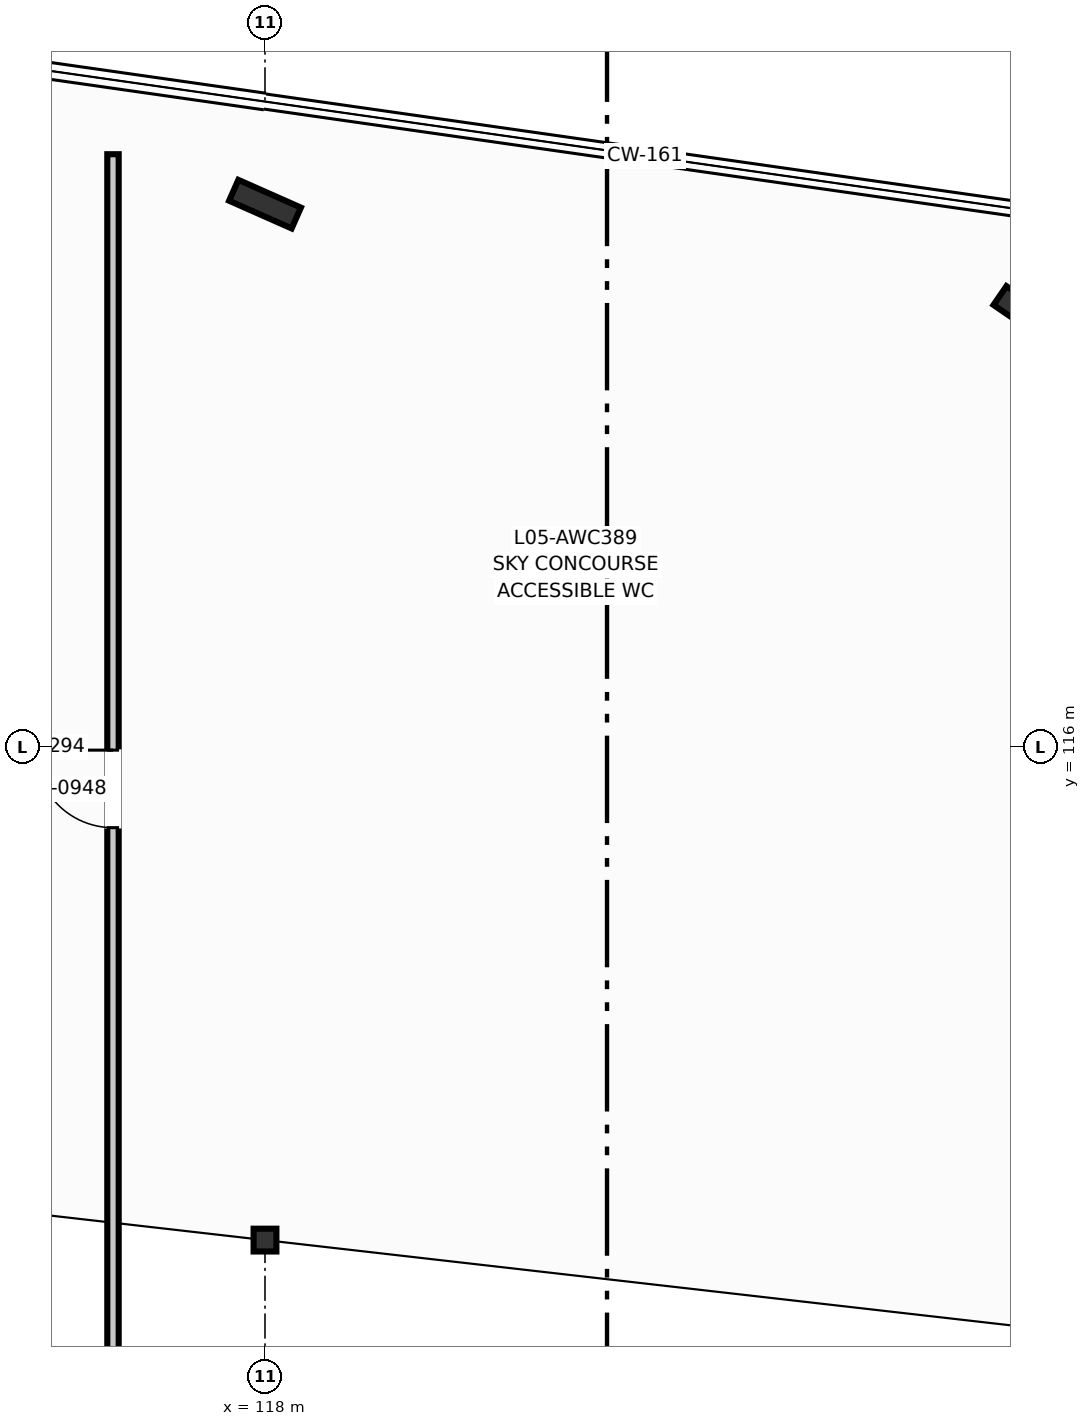
"""IFC4 building model, lengths in metres.
Left out: names, types, materials, properties, quantities, classifications, styles, units other than length and angle.
Written with IfcOpenShell. Run it as: python <this file> out.ifc"""

import sys

from ifc_helpers import new_model, si_unit, direction, frame, frame_2d, origin, origin_2d, place, context, subcontext, project, spatial, rectangle, i_section, extrude, element, fill, save


model = new_model("IFC4")
c1 = context("Model", 3, precision=1e-05, world=origin(), true_north=direction((0.0, 1.0)))
c2 = subcontext(c1, "Body", "Model", "MODEL_VIEW")
j1 = project(units=[si_unit("LENGTHUNIT", "METRE"), si_unit("PLANEANGLEUNIT", "RADIAN")], contexts=[c1])
p1 = place(None, origin())
s1 = spatial("IfcSite", under=j1, at=p1, CompositionType="ELEMENT")
p2 = place(p1, origin())
s2 = spatial("IfcBuilding", under=s1, at=p2, CompositionType="ELEMENT")
p3 = place(p2, frame((0.0, 0.0, 22.5)))
s3 = spatial("IfcBuildingStorey", under=s2, at=p3, CompositionType="ELEMENT", Elevation=22.5)
p4 = place(p3, frame((118.0, 109.514, 0.0), z_axis=(0.0, 0.0, 1.0), x_axis=(1.0, 0.0, 0.0)))
e1 = element("IfcColumn", 1, at=p4, inside=s3, PredefinedType="COLUMN", context=c2, shape_type="SweptSolid", body=[
    extrude(i_section(OverallWidth=0.3, OverallDepth=0.3, WebThickness=0.011, FlangeThickness=0.019, at=origin_2d()), origin(), (0.0, 0.0, 1.0), 4.5),
])
p5 = place(p3, frame((128.0, 121.714, 0.0), z_axis=(0.0, 0.0, 1.0), x_axis=(0.566406236925, 0.824126188622, 0.0)))
e2 = element("IfcColumn", 2, at=p5, inside=s3, PredefinedType="COLUMN", context=c2, shape_type="SweptSolid", body=[
    extrude(i_section(OverallWidth=0.3, OverallDepth=0.8, WebThickness=0.018, FlangeThickness=0.033, at=origin_2d()), origin(), (0.0, 0.0, 1.0), 3.007),
])
p6 = place(p3, frame((118.0, 123.143, 0.0), z_axis=(0.0, 0.0, 1.0), x_axis=(0.40514158678, 0.914253955234, 0.0)))
e3 = element("IfcColumn", 3, at=p6, inside=s3, PredefinedType="COLUMN", context=c2, shape_type="SweptSolid", body=[
    extrude(i_section(OverallWidth=0.3, OverallDepth=0.9, WebThickness=0.019, FlangeThickness=0.035, at=origin_2d()), origin(), (0.0, 0.0, 1.0), 3.867),
])
p7 = place(p3, frame((116.0, 107.1, 0.0), z_axis=(0.0, 0.0, 1.0), x_axis=(0.0, 1.0, 0.0)))
e4 = element("IfcWall", 4, at=p7, inside=s3, PredefinedType="PARTITIONING", context=c2, shape_type="SweptSolid", body=[
    extrude(rectangle(XDim=16.7, YDim=0.15, at=frame_2d((8.35, 0.0))), origin(), (0.0, 0.0, 1.0), 3.22),
])
p8 = place(p7, frame((7.84, 0.0, 0.0)))
e5 = element("IfcOpeningElement", 5, at=p8, cuts=e4, PredefinedType="OPENING", context=c2, shape_type="SweptSolid", body=[
    extrude(rectangle(XDim=1.02, YDim=2.15, at=frame_2d((0.51, 1.075))), frame((0.0, 0.085, 0.0), z_axis=(0.0, -1.0, 0.0), x_axis=(1.0, 0.0, 0.0)), (0.0, 0.0, 1.0), 0.17),
])
p9 = place(p8, origin())
e6 = element("IfcDoor", 6, at=p9, inside=s3, OperationType="SINGLE_SWING_RIGHT", PredefinedType="DOOR", context=c2, shape_type="SweptSolid", body=[
    extrude(rectangle(XDim=1.02, YDim=2.15, at=frame_2d((0.51, 1.075))), frame((0.0, 0.025, 0.0), z_axis=(0.0, -1.0, 0.0), x_axis=(1.0, 0.0, 0.0)), (0.0, 0.0, 1.0), 0.05),
])
fill(e5, e6)
save(model, sys.argv[1])
